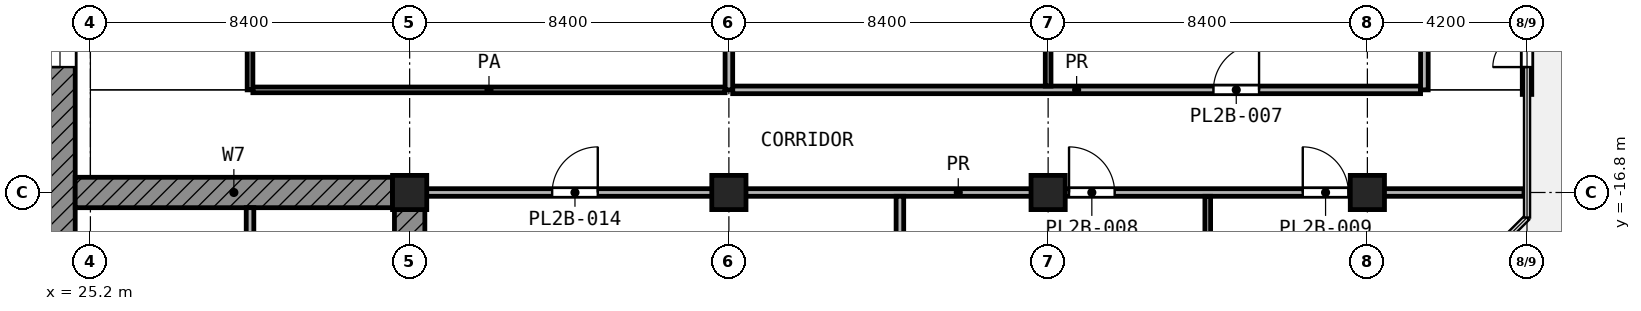
"""IFC4 building model, lengths in metres.
Left out: names, types, materials, properties, quantities, classifications, styles, units other than length and angle.
Written with IfcOpenShell. Run it as: python <this file> out.ifc"""

import sys

from ifc_helpers import new_model, si_unit, direction, frame, frame_2d, origin, origin_2d, place, context, subcontext, project, spatial, rectangle, extrude, element, fill, save


model = new_model("IFC4")
c1 = context("Model", 3, precision=1e-05, world=origin(), true_north=direction((0.0, 1.0)))
c2 = subcontext(c1, "Body", "Model", "MODEL_VIEW")
j1 = project(units=[si_unit("LENGTHUNIT", "METRE"), si_unit("PLANEANGLEUNIT", "RADIAN")], contexts=[c1])
p1 = place(None, origin())
s1 = spatial("IfcSite", under=j1, at=p1, CompositionType="ELEMENT")
p2 = place(p1, origin())
s2 = spatial("IfcBuilding", under=s1, at=p2, CompositionType="ELEMENT")
p3 = place(p2, frame((0.0, 0.0, 213.0)))
s3 = spatial("IfcBuildingStorey", under=s2, at=p3, CompositionType="ELEMENT", Elevation=213.0)
for number, where, z_axis, x_axis in (
    (1, (33.6, -16.8, 0.0), (0.0, 0.0, 1.0), (1.0, 0.0, 0.0)),
    (2, (42.0, -16.8, 0.0), (0.0, 0.0, 1.0), (1.0, 0.0, 0.0)),
    (3, (50.4, -16.8, 0.0), (0.0, 0.0, 1.0), (1.0, 0.0, 0.0)),
    (4, (58.8, -16.8, 0.0), (0.0, 0.0, 1.0), (1.0, 0.0, 0.0)),
):
    element("IfcColumn", number, at=place(p3, frame(where, z_axis=z_axis, x_axis=x_axis)), inside=s3, PredefinedType="COLUMN", context=c2, shape_type="SweptSolid", body=[
        extrude(rectangle(XDim=0.9, YDim=0.9, at=origin_2d()), origin(), (0.0, 0.0, 1.0), 5.0),
    ])
p4 = place(p3, frame((24.8, -16.8, 0.0), z_axis=(0.0, 0.0, 1.0), x_axis=(1.0, 0.0, 0.0)))
e5 = element("IfcWall", 5, at=p4, inside=s3, PredefinedType="SHEAR", context=c2, shape_type="SweptSolid", body=[
    extrude(rectangle(XDim=8.35, YDim=0.8, at=frame_2d((4.175, 0.0))), origin(), (0.0, 0.0, 1.0), 4.4),
])
p5 = place(p3, frame((33.6, -17.25, 0.0), z_axis=(0.0, 0.0, 1.0), x_axis=(0.0, -1.0, 0.0)))
e6 = element("IfcWall", 6, at=p5, inside=s3, PredefinedType="SHEAR", context=c2, shape_type="SweptSolid", body=[
    extrude(rectangle(XDim=3.45, YDim=0.8, at=frame_2d((1.725, 0.0))), origin(), (0.0, 0.0, 1.0), 4.4),
])
p6 = place(p3, frame((63.001, -14.22, 0.0), z_axis=(0.0, 0.0, 1.0), x_axis=(0.0, 1.0, 0.0)))
e7 = element("IfcWall", 7, at=p6, inside=s3, PredefinedType="SOLIDWALL", context=c2, shape_type="SweptSolid", body=[
    extrude(rectangle(XDim=3.24, YDim=0.25, at=frame_2d((1.62, 0.0))), origin(), (0.0, 0.0, 1.0), 4.24),
])
p7 = place(p6, frame((0.72, 0.0, 0.0)))
e8 = element("IfcOpeningElement", 8, at=p7, cuts=e7, PredefinedType="OPENING", context=c2, shape_type="SweptSolid", body=[
    extrude(rectangle(XDim=1.8, YDim=2.1, at=frame_2d((0.9, 1.05))), frame((0.0, 0.135, 0.0), z_axis=(0.0, -1.0, 0.0), x_axis=(1.0, 0.0, 0.0)), (0.0, 0.0, 1.0), 0.27),
])
p8 = place(p3, frame((24.4, -24.0, 0.0), z_axis=(0.0, 0.0, 1.0), x_axis=(0.0, 1.0, 0.0)))
e9 = element("IfcWall", 9, at=p8, inside=s3, PredefinedType="SHEAR", context=c2, shape_type="SweptSolid", body=[
    extrude(rectangle(XDim=18.6, YDim=0.8, at=frame_2d((9.3, 0.0))), origin(), (0.0, 0.0, 1.0), 4.4),
])
p9 = place(p8, frame((10.5, 0.0, 0.0)))
e10 = element("IfcOpeningElement", 10, at=p9, cuts=e9, PredefinedType="OPENING", context=c2, shape_type="SweptSolid", body=[
    extrude(rectangle(XDim=1.8, YDim=2.1, at=frame_2d((0.9, 1.05))), frame((0.0, 0.41, 0.0), z_axis=(0.0, -1.0, 0.0), x_axis=(1.0, 0.0, 0.0)), (0.0, 0.0, 1.0), 0.82),
])
p10 = place(p3, frame((29.475, -14.1, 0.0), z_axis=(0.0, 0.0, 1.0), x_axis=(1.0, 0.0, 0.0)))
e11 = element("IfcWall", 11, at=p10, inside=s3, PredefinedType="PARTITIONING", context=c2, shape_type="SweptSolid", body=[
    extrude(rectangle(XDim=12.425, YDim=0.15, at=frame_2d((6.212, 0.0))), origin(), (0.0, 0.0, 1.0), 4.4),
])
p11 = place(p3, frame((29.4, -14.1, 0.0), z_axis=(0.0, 0.0, 1.0), x_axis=(0.0, 1.0, 0.0)))
e12 = element("IfcWall", 12, at=p11, inside=s3, PredefinedType="PARTITIONING", context=c2, shape_type="SweptSolid", body=[
    extrude(rectangle(XDim=2.997, YDim=0.15, at=frame_2d((1.499, 0.0))), origin(), (0.0, 0.0, 1.0), 4.4),
])
p12 = place(p3, frame((50.4, -14.0, 0.0), z_axis=(0.0, 0.0, 1.0), x_axis=(0.0, 1.0, 0.0)))
e13 = element("IfcWall", 13, at=p12, inside=s3, PredefinedType="PARTITIONING", context=c2, shape_type="SweptSolid", body=[
    extrude(rectangle(XDim=2.8, YDim=0.15, at=frame_2d((1.4, 0.0))), origin(), (0.0, 0.0, 1.0), 4.4),
])
p13 = place(p3, frame((54.6, -20.92, 0.0), z_axis=(0.0, 0.0, 1.0), x_axis=(0.0, 1.0, 0.0)))
e14 = element("IfcWall", 14, at=p13, inside=s3, PredefinedType="PARTITIONING", context=c2, shape_type="SweptSolid", body=[
    extrude(rectangle(XDim=4.02, YDim=0.15, at=frame_2d((2.01, 0.0))), origin(), (0.0, 0.0, 1.0), 4.4),
])
p14 = place(p3, frame((33.15, -16.8, 0.0), z_axis=(0.0, 0.0, 1.0), x_axis=(1.0, 0.0, 0.0)))
e15 = element("IfcWall", 15, at=p14, inside=s3, PredefinedType="PARTITIONING", context=c2, shape_type="SweptSolid", body=[
    extrude(rectangle(XDim=29.771, YDim=0.2, at=frame_2d((14.885, 0.0))), origin(), (0.0, 0.0, 1.0), 4.4),
])
p15 = place(p14, frame((4.2, 0.0, 0.0)))
e16 = element("IfcOpeningElement", 16, at=p15, cuts=e15, PredefinedType="OPENING", context=c2, shape_type="SweptSolid", body=[
    extrude(rectangle(XDim=1.2, YDim=2.1, at=frame_2d((0.6, 1.05))), frame((0.0, 0.11, 0.0), z_axis=(0.0, -1.0, 0.0), x_axis=(1.0, 0.0, 0.0)), (0.0, 0.0, 1.0), 0.22),
])
p16 = place(p14, frame((17.8, 0.0, 0.0)))
e17 = element("IfcOpeningElement", 17, at=p16, cuts=e15, PredefinedType="OPENING", context=c2, shape_type="SweptSolid", body=[
    extrude(rectangle(XDim=1.2, YDim=2.1, at=frame_2d((0.6, 1.05))), frame((0.0, 0.11, 0.0), z_axis=(0.0, -1.0, 0.0), x_axis=(1.0, 0.0, 0.0)), (0.0, 0.0, 1.0), 0.22),
])
p17 = place(p14, frame((23.95, 0.0, 0.0)))
e18 = element("IfcOpeningElement", 18, at=p17, cuts=e15, PredefinedType="OPENING", context=c2, shape_type="SweptSolid", body=[
    extrude(rectangle(XDim=1.2, YDim=2.1, at=frame_2d((0.6, 1.05))), frame((0.0, 0.11, 0.0), z_axis=(0.0, -1.0, 0.0), x_axis=(1.0, 0.0, 0.0)), (0.0, 0.0, 1.0), 0.22),
])
p18 = place(p3, frame((42.1, -14.1, 0.0), z_axis=(0.0, 0.0, 1.0), x_axis=(1.0, 0.0, 0.0)))
e19 = element("IfcWall", 19, at=p18, inside=s3, PredefinedType="PARTITIONING", context=c2, shape_type="SweptSolid", body=[
    extrude(rectangle(XDim=18.1, YDim=0.2, at=frame_2d((9.05, 0.0))), origin(), (0.0, 0.0, 1.0), 4.4),
])
p19 = place(p18, frame((12.65, 0.0, 0.0)))
e20 = element("IfcOpeningElement", 20, at=p19, cuts=e19, PredefinedType="OPENING", context=c2, shape_type="SweptSolid", body=[
    extrude(rectangle(XDim=1.2, YDim=2.1, at=frame_2d((0.6, 1.05))), frame((0.0, 0.11, 0.0), z_axis=(0.0, -1.0, 0.0), x_axis=(1.0, 0.0, 0.0)), (0.0, 0.0, 1.0), 0.22),
])
p20 = place(p3, frame((29.4, -20.947, 0.0), z_axis=(0.0, 0.0, 1.0), x_axis=(0.0, 1.0, 0.0)))
e21 = element("IfcWall", 21, at=p20, inside=s3, PredefinedType="PARTITIONING", context=c2, shape_type="SweptSolid", body=[
    extrude(rectangle(XDim=3.748, YDim=0.2, at=frame_2d((1.874, 0.0))), origin(), (0.0, 0.0, 1.0), 4.4),
])
p21 = place(p3, frame((42.0, -14.1, 0.0), z_axis=(0.0, 0.0, 1.0), x_axis=(0.0, 1.0, 0.0)))
e22 = element("IfcWall", 22, at=p21, inside=s3, PredefinedType="PARTITIONING", context=c2, shape_type="SweptSolid", body=[
    extrude(rectangle(XDim=3.0, YDim=0.2, at=frame_2d((1.5, 0.0))), origin(), (0.0, 0.0, 1.0), 4.4),
])
p22 = place(p3, frame((46.5, -20.92, 0.0), z_axis=(0.0, 0.0, 1.0), x_axis=(0.0, 1.0, 0.0)))
e23 = element("IfcWall", 23, at=p22, inside=s3, PredefinedType="PARTITIONING", context=c2, shape_type="SweptSolid", body=[
    extrude(rectangle(XDim=4.02, YDim=0.2, at=frame_2d((2.01, 0.0))), origin(), (0.0, 0.0, 1.0), 4.4),
])
p23 = place(p3, frame((60.3, -14.1, 0.0), z_axis=(0.0, 0.0, 1.0), x_axis=(0.0, 1.0, 0.0)))
e24 = element("IfcWall", 24, at=p23, inside=s3, PredefinedType="PARTITIONING", context=c2, shape_type="SweptSolid", body=[
    extrude(rectangle(XDim=2.997, YDim=0.2, at=frame_2d((1.499, 0.0))), origin(), (0.0, 0.0, 1.0), 4.4),
])
p24 = place(p7, origin())
e25 = element("IfcDoor", 25, at=p24, inside=s3, OperationType="DOUBLE_DOOR_SINGLE_SWING", PredefinedType="DOOR", context=c2, shape_type="SweptSolid", body=[
    extrude(rectangle(XDim=1.8, YDim=2.1, at=frame_2d((0.9, 1.05))), frame((0.0, 0.025, 0.0), z_axis=(0.0, -1.0, 0.0), x_axis=(1.0, 0.0, 0.0)), (0.0, 0.0, 1.0), 0.05),
])
fill(e8, e25)
p25 = place(p9, origin())
e26 = element("IfcDoor", 26, at=p25, inside=s3, OperationType="DOUBLE_DOOR_SINGLE_SWING", PredefinedType="DOOR", context=c2, shape_type="SweptSolid", body=[
    extrude(rectangle(XDim=1.8, YDim=2.1, at=frame_2d((0.9, 1.05))), frame((0.0, 0.025, 0.0), z_axis=(0.0, -1.0, 0.0), x_axis=(1.0, 0.0, 0.0)), (0.0, 0.0, 1.0), 0.05),
])
fill(e10, e26)
p26 = place(p19, origin())
e27 = element("IfcDoor", 27, at=p26, inside=s3, OperationType="SINGLE_SWING_RIGHT", PredefinedType="DOOR", context=c2, shape_type="SweptSolid", body=[
    extrude(rectangle(XDim=1.2, YDim=2.1, at=frame_2d((0.6, 1.05))), frame((0.0, 0.025, 0.0), z_axis=(0.0, -1.0, 0.0), x_axis=(1.0, 0.0, 0.0)), (0.0, 0.0, 1.0), 0.05),
])
fill(e20, e27)
p27 = place(p15, origin())
e28 = element("IfcDoor", 28, at=p27, inside=s3, OperationType="SINGLE_SWING_RIGHT", PredefinedType="DOOR", context=c2, shape_type="SweptSolid", body=[
    extrude(rectangle(XDim=1.2, YDim=2.1, at=frame_2d((0.6, 1.05))), frame((0.0, 0.025, 0.0), z_axis=(0.0, -1.0, 0.0), x_axis=(1.0, 0.0, 0.0)), (0.0, 0.0, 1.0), 0.05),
])
fill(e16, e28)
p28 = place(p16, origin())
e29 = element("IfcDoor", 29, at=p28, inside=s3, OperationType="SINGLE_SWING_LEFT", PredefinedType="DOOR", context=c2, shape_type="SweptSolid", body=[
    extrude(rectangle(XDim=1.2, YDim=2.1, at=frame_2d((0.6, 1.05))), frame((0.0, 0.025, 0.0), z_axis=(0.0, -1.0, 0.0), x_axis=(1.0, 0.0, 0.0)), (0.0, 0.0, 1.0), 0.05),
])
fill(e17, e29)
p29 = place(p17, origin())
e30 = element("IfcDoor", 30, at=p29, inside=s3, OperationType="SINGLE_SWING_LEFT", PredefinedType="DOOR", context=c2, shape_type="SweptSolid", body=[
    extrude(rectangle(XDim=1.2, YDim=2.1, at=frame_2d((0.6, 1.05))), frame((0.0, 0.025, 0.0), z_axis=(0.0, -1.0, 0.0), x_axis=(1.0, 0.0, 0.0)), (0.0, 0.0, 1.0), 0.05),
])
fill(e18, e30)
save(model, sys.argv[1])
